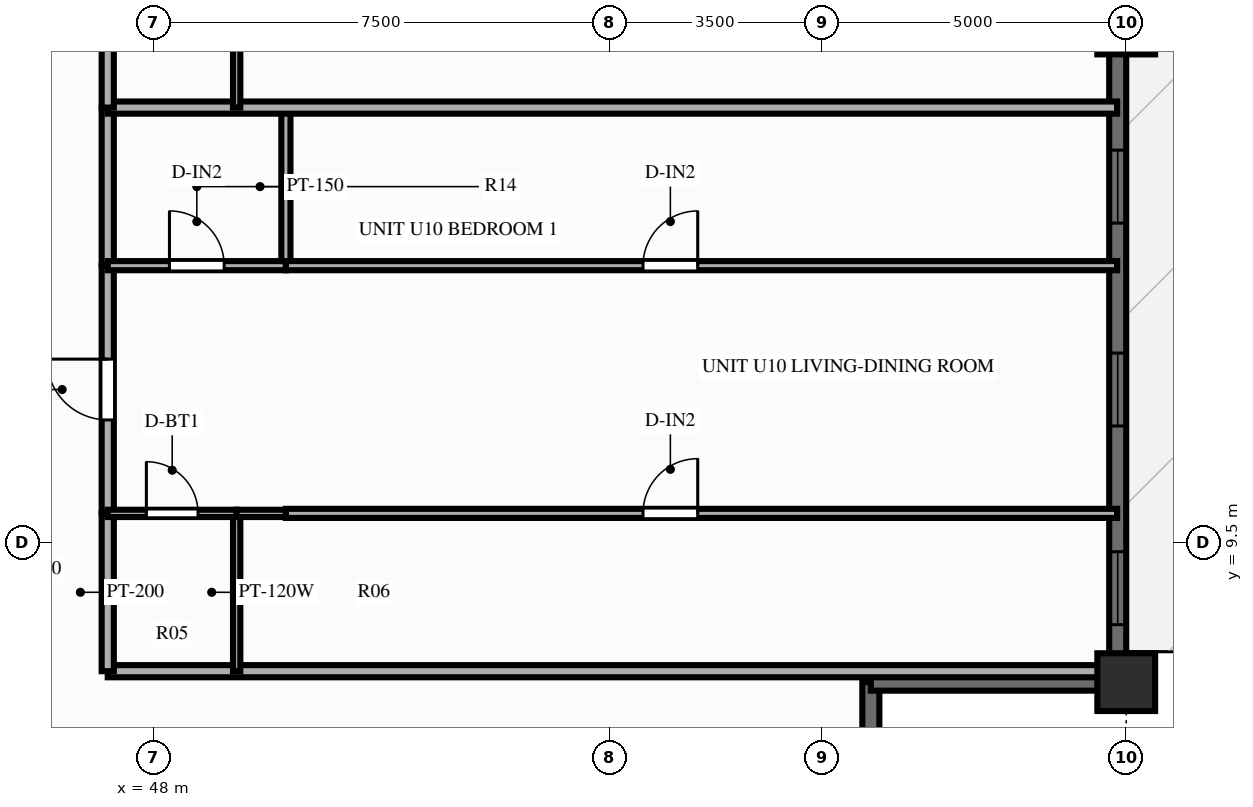
"""IFC4 building model, lengths in metres.
Left out: names, types, materials, properties, quantities, classifications, styles, units other than length and angle.
Written with IfcOpenShell. Run it as: python <this file> out.ifc"""

import sys

from ifc_helpers import new_model, si_unit, direction, frame, frame_2d, origin, origin_2d, place, context, subcontext, project, spatial, rectangle, extrude, source, transform, mapped, element, fill, save


model = new_model("IFC4")
c1 = context("Model", 3, precision=1e-05, world=origin(), true_north=direction((0.0, 1.0)))
c2 = subcontext(c1, "Body", "Model", "MODEL_VIEW")
j1 = project(units=[si_unit("LENGTHUNIT", "METRE"), si_unit("PLANEANGLEUNIT", "RADIAN")], contexts=[c1])
p1 = place(None, origin())
s1 = spatial("IfcSite", under=j1, at=p1, CompositionType="ELEMENT")
p2 = place(p1, origin())
s2 = spatial("IfcBuilding", under=s1, at=p2, CompositionType="ELEMENT")
p3 = place(p2, frame((0.0, 0.0, 110.85)))
s3 = spatial("IfcBuildingStorey", under=s2, at=p3, CompositionType="ELEMENT", Elevation=110.85)
m1 = source(origin(), c2, "Body", "SweptSolid", [
    extrude(rectangle(XDim=0.95, YDim=0.95, at=origin_2d()), origin(), (0.0, 0.0, 1.0), 3.0),
])
for number, where, z_axis, x_axis in (
    (1, (64.0, 7.2, 0.0), (0.0, 0.0, 1.0), (1.0, 0.0, 0.0)),
    (2, (64.0, 18.0, 0.0), (0.0, 0.0, 1.0), (1.0, 0.0, 0.0)),
):
    element("IfcColumn", number, at=place(p3, frame(where, z_axis=z_axis, x_axis=x_axis)), inside=s3, PredefinedType="COLUMN", context=c2, shape_type="MappedRepresentation", body=[
        mapped(m1, transform((0.0, 0.0, 0.0), scale=1.0)),
    ])
p4 = place(p3, frame((63.86, 7.2, 0.0), z_axis=(0.0, 0.0, 1.0), x_axis=(0.0, 1.0, 0.0)))
e3 = element("IfcWall", 3, at=p4, inside=s3, PredefinedType="SOLIDWALL", context=c2, shape_type="SweptSolid", body=[
    extrude(rectangle(XDim=39.6, YDim=0.28, at=frame_2d((19.8, 0.0))), origin(), (0.0, 0.0, 1.0), 2.28),
])
p5 = place(p4, frame((0.945, 0.0, 0.25)))
e4 = element("IfcOpeningElement", 4, at=p5, cuts=e3, PredefinedType="OPENING", context=c2, shape_type="SweptSolid", body=[
    extrude(rectangle(XDim=1.2, YDim=1.5, at=frame_2d((0.6, 0.75))), frame((0.0, 0.152, 0.0), z_axis=(0.0, -1.0, 0.0), x_axis=(1.0, 0.0, 0.0)), (0.0, 0.0, 1.0), 0.304),
])
p6 = place(p4, frame((4.213, 0.0, 0.25)))
e5 = element("IfcOpeningElement", 5, at=p6, cuts=e3, PredefinedType="OPENING", context=c2, shape_type="SweptSolid", body=[
    extrude(rectangle(XDim=1.2, YDim=1.5, at=frame_2d((0.6, 0.75))), frame((0.0, 0.152, 0.0), z_axis=(0.0, -1.0, 0.0), x_axis=(1.0, 0.0, 0.0)), (0.0, 0.0, 1.0), 0.304),
])
p7 = place(p4, frame((7.55, 0.0, 0.25)))
e6 = element("IfcOpeningElement", 6, at=p7, cuts=e3, PredefinedType="OPENING", context=c2, shape_type="SweptSolid", body=[
    extrude(rectangle(XDim=1.2, YDim=1.5, at=frame_2d((0.6, 0.75))), frame((0.0, 0.152, 0.0), z_axis=(0.0, -1.0, 0.0), x_axis=(1.0, 0.0, 0.0)), (0.0, 0.0, 1.0), 0.304),
])
p8 = place(p4, frame((13.483, 0.0, 0.25)))
e7 = element("IfcOpeningElement", 7, at=p8, cuts=e3, PredefinedType="OPENING", context=c2, shape_type="SweptSolid", body=[
    extrude(rectangle(XDim=1.2, YDim=1.5, at=frame_2d((0.6, 0.75))), frame((0.0, 0.152, 0.0), z_axis=(0.0, -1.0, 0.0), x_axis=(1.0, 0.0, 0.0)), (0.0, 0.0, 1.0), 0.304),
])
p9 = place(p4, frame((16.82, 0.0, 0.25)))
e8 = element("IfcOpeningElement", 8, at=p9, cuts=e3, PredefinedType="OPENING", context=c2, shape_type="SweptSolid", body=[
    extrude(rectangle(XDim=1.2, YDim=1.5, at=frame_2d((0.6, 0.75))), frame((0.0, 0.152, 0.0), z_axis=(0.0, -1.0, 0.0), x_axis=(1.0, 0.0, 0.0)), (0.0, 0.0, 1.0), 0.304),
])
p10 = place(p4, frame((19.2, 0.0, 0.25)))
e9 = element("IfcOpeningElement", 9, at=p10, cuts=e3, PredefinedType="OPENING", context=c2, shape_type="SweptSolid", body=[
    extrude(rectangle(XDim=1.2, YDim=1.5, at=frame_2d((0.6, 0.75))), frame((0.0, 0.152, 0.0), z_axis=(0.0, -1.0, 0.0), x_axis=(1.0, 0.0, 0.0)), (0.0, 0.0, 1.0), 0.304),
])
p11 = place(p4, frame((21.578, 0.0, 0.25)))
e10 = element("IfcOpeningElement", 10, at=p11, cuts=e3, PredefinedType="OPENING", context=c2, shape_type="SweptSolid", body=[
    extrude(rectangle(XDim=1.2, YDim=1.5, at=frame_2d((0.6, 0.75))), frame((0.0, 0.152, 0.0), z_axis=(0.0, -1.0, 0.0), x_axis=(1.0, 0.0, 0.0)), (0.0, 0.0, 1.0), 0.304),
])
p12 = place(p4, frame((26.313, 0.0, 0.0), z_axis=(0.0, 0.0, 1.0), x_axis=(-1.0, 0.0, 0.0)))
e11 = element("IfcOpeningElement", 11, at=p12, cuts=e3, PredefinedType="OPENING", context=c2, shape_type="SweptSolid", body=[
    extrude(rectangle(XDim=1.6, YDim=2.15, at=frame_2d((0.8, 1.075))), frame((0.0, 0.152, 0.0), z_axis=(0.0, -1.0, 0.0), x_axis=(1.0, 0.0, 0.0)), (0.0, 0.0, 1.0), 0.304),
])
p13 = place(p4, frame((29.305, 0.0, 0.25)))
e12 = element("IfcOpeningElement", 12, at=p13, cuts=e3, PredefinedType="OPENING", context=c2, shape_type="SweptSolid", body=[
    extrude(rectangle(XDim=0.7, YDim=1.5, at=frame_2d((0.35, 0.75))), frame((0.0, 0.152, 0.0), z_axis=(0.0, -1.0, 0.0), x_axis=(1.0, 0.0, 0.0)), (0.0, 0.0, 1.0), 0.304),
])
p14 = place(p4, frame((30.848, 0.0, 0.25)))
e13 = element("IfcOpeningElement", 13, at=p14, cuts=e3, PredefinedType="OPENING", context=c2, shape_type="SweptSolid", body=[
    extrude(rectangle(XDim=1.2, YDim=1.5, at=frame_2d((0.6, 0.75))), frame((0.0, 0.152, 0.0), z_axis=(0.0, -1.0, 0.0), x_axis=(1.0, 0.0, 0.0)), (0.0, 0.0, 1.0), 0.304),
])
p15 = place(p4, frame((34.183, 0.0, 0.25)))
e14 = element("IfcOpeningElement", 14, at=p15, cuts=e3, PredefinedType="OPENING", context=c2, shape_type="SweptSolid", body=[
    extrude(rectangle(XDim=1.2, YDim=1.5, at=frame_2d((0.6, 0.75))), frame((0.0, 0.152, 0.0), z_axis=(0.0, -1.0, 0.0), x_axis=(1.0, 0.0, 0.0)), (0.0, 0.0, 1.0), 0.304),
])
p16 = place(p4, frame((37.452, 0.0, 0.25)))
e15 = element("IfcOpeningElement", 15, at=p16, cuts=e3, PredefinedType="OPENING", context=c2, shape_type="SweptSolid", body=[
    extrude(rectangle(XDim=1.2, YDim=1.5, at=frame_2d((0.6, 0.75))), frame((0.0, 0.152, 0.0), z_axis=(0.0, -1.0, 0.0), x_axis=(1.0, 0.0, 0.0)), (0.0, 0.0, 1.0), 0.304),
])
for number, where, z_axis, x_axis in (
    (16, (59.8, 3.08, 0.0), (0.0, 0.0, 1.0), (0.0, 1.0, 0.0)),
    (17, (59.8, 7.2, 0.0), (0.0, 0.0, 1.0), (1.0, 0.0, 0.0)),
):
    element("IfcWall", number, at=place(p3, frame(where, z_axis=z_axis, x_axis=x_axis)), inside=s3, PredefinedType="SOLIDWALL", context=c2, shape_type="SweptSolid", body=[
        extrude(rectangle(XDim=4.12, YDim=0.28, at=frame_2d((2.06, 0.0))), origin(), (0.0, 0.0, 1.0), 2.28),
    ])
p17 = place(p3, frame((47.25, 7.38, 0.0), z_axis=(0.0, 0.0, 1.0), x_axis=(1.0, 0.0, 0.0)))
e18 = element("IfcWall", 18, at=p17, inside=s3, PredefinedType="PARTITIONING", context=c2, shape_type="SweptSolid", body=[
    extrude(rectangle(XDim=16.6, YDim=0.2, at=frame_2d((8.3, 0.0))), origin(), (0.0, 0.0, 1.0), 2.79),
])
p18 = place(p3, frame((47.25, 7.38, 0.0), z_axis=(0.0, 0.0, 1.0), x_axis=(0.0, 1.0, 0.0)))
e19 = element("IfcWall", 19, at=p18, inside=s3, PredefinedType="PARTITIONING", context=c2, shape_type="SweptSolid", body=[
    extrude(rectangle(XDim=2.596, YDim=0.2, at=frame_2d((1.298, 0.0))), origin(), (0.0, 0.0, 1.0), 2.79),
])
p19 = place(p3, frame((47.25, 9.976, 0.0), z_axis=(0.0, 0.0, 1.0), x_axis=(0.0, 1.0, 0.0)))
e20 = element("IfcWall", 20, at=p19, inside=s3, PredefinedType="PARTITIONING", context=c2, shape_type="SweptSolid", body=[
    extrude(rectangle(XDim=4.074, YDim=0.2, at=frame_2d((2.037, 0.0))), origin(), (0.0, 0.0, 1.0), 2.79),
])
p20 = place(p19, frame((1.537, 0.0, 0.0)))
e21 = element("IfcOpeningElement", 21, at=p20, cuts=e20, PredefinedType="OPENING", context=c2, shape_type="SweptSolid", body=[
    extrude(rectangle(XDim=1.0, YDim=2.15, at=frame_2d((0.5, 1.075))), frame((0.0, 0.112, 0.0), z_axis=(0.0, -1.0, 0.0), x_axis=(1.0, 0.0, 0.0)), (0.0, 0.0, 1.0), 0.224),
])
p21 = place(p3, frame((47.25, 14.05, 0.0), z_axis=(0.0, 0.0, 1.0), x_axis=(0.0, 1.0, 0.0)))
e22 = element("IfcWall", 22, at=p21, inside=s3, PredefinedType="PARTITIONING", context=c2, shape_type="SweptSolid", body=[
    extrude(rectangle(XDim=2.6, YDim=0.2, at=frame_2d((1.3, 0.0))), origin(), (0.0, 0.0, 1.0), 2.79),
])
p22 = place(p3, frame((49.37, 7.38, 0.0), z_axis=(0.0, 0.0, 1.0), x_axis=(0.0, 1.0, 0.0)))
e23 = element("IfcWall", 23, at=p22, inside=s3, PredefinedType="PARTITIONING", context=c2, shape_type="SweptSolid", body=[
    extrude(rectangle(XDim=2.596, YDim=0.12, at=frame_2d((1.298, 0.0))), origin(), (0.0, 0.0, 1.0), 2.79),
])
p23 = place(p3, frame((50.18, 14.05, 0.0), z_axis=(0.0, 0.0, 1.0), x_axis=(0.0, 1.0, 0.0)))
e24 = element("IfcWall", 24, at=p23, inside=s3, PredefinedType="PARTITIONING", context=c2, shape_type="SweptSolid", body=[
    extrude(rectangle(XDim=2.6, YDim=0.15, at=frame_2d((1.3, 0.0))), origin(), (0.0, 0.0, 1.0), 2.79),
])
p24 = place(p3, frame((47.25, 9.976, 0.0), z_axis=(0.0, 0.0, 1.0), x_axis=(1.0, 0.0, 0.0)))
e25 = element("IfcWall", 25, at=p24, inside=s3, PredefinedType="PARTITIONING", context=c2, shape_type="SweptSolid", body=[
    extrude(rectangle(XDim=2.12, YDim=0.12, at=frame_2d((1.06, 0.0))), origin(), (0.0, 0.0, 1.0), 2.79),
])
p25 = place(p24, frame((0.635, 0.0, 0.0)))
e26 = element("IfcOpeningElement", 26, at=p25, cuts=e25, PredefinedType="OPENING", context=c2, shape_type="SweptSolid", body=[
    extrude(rectangle(XDim=0.85, YDim=2.05, at=frame_2d((0.425, 1.025))), frame((0.0, 0.072, 0.0), z_axis=(0.0, -1.0, 0.0), x_axis=(1.0, 0.0, 0.0)), (0.0, 0.0, 1.0), 0.144),
])
p26 = place(p3, frame((49.37, 9.976, 0.0), z_axis=(0.0, 0.0, 1.0), x_axis=(1.0, 0.0, 0.0)))
e27 = element("IfcWall", 27, at=p26, inside=s3, PredefinedType="PARTITIONING", context=c2, shape_type="SweptSolid", body=[
    extrude(rectangle(XDim=0.81, YDim=0.12, at=frame_2d((0.405, 0.0))), origin(), (0.0, 0.0, 1.0), 2.79),
])
p27 = place(p3, frame((50.18, 9.976, 0.0), z_axis=(0.0, 0.0, 1.0), x_axis=(1.0, 0.0, 0.0)))
e28 = element("IfcWall", 28, at=p27, inside=s3, PredefinedType="PARTITIONING", context=c2, shape_type="SweptSolid", body=[
    extrude(rectangle(XDim=13.67, YDim=0.15, at=frame_2d((6.835, 0.0))), origin(), (0.0, 0.0, 1.0), 2.79),
])
p28 = place(p27, frame((5.873, 0.0, 0.0)))
e29 = element("IfcOpeningElement", 29, at=p28, cuts=e28, PredefinedType="OPENING", context=c2, shape_type="SweptSolid", body=[
    extrude(rectangle(XDim=0.9, YDim=2.1, at=frame_2d((0.45, 1.05))), frame((0.0, 0.087, 0.0), z_axis=(0.0, -1.0, 0.0), x_axis=(1.0, 0.0, 0.0)), (0.0, 0.0, 1.0), 0.174),
])
p29 = place(p3, frame((47.25, 14.05, 0.0), z_axis=(0.0, 0.0, 1.0), x_axis=(1.0, 0.0, 0.0)))
e30 = element("IfcWall", 30, at=p29, inside=s3, PredefinedType="PARTITIONING", context=c2, shape_type="SweptSolid", body=[
    extrude(rectangle(XDim=2.93, YDim=0.15, at=frame_2d((1.465, 0.0))), origin(), (0.0, 0.0, 1.0), 2.79),
])
p30 = place(p29, frame((1.015, 0.0, 0.0)))
e31 = element("IfcOpeningElement", 31, at=p30, cuts=e30, PredefinedType="OPENING", context=c2, shape_type="SweptSolid", body=[
    extrude(rectangle(XDim=0.9, YDim=2.1, at=frame_2d((0.45, 1.05))), frame((0.0, 0.087, 0.0), z_axis=(0.0, -1.0, 0.0), x_axis=(1.0, 0.0, 0.0)), (0.0, 0.0, 1.0), 0.174),
])
p31 = place(p3, frame((50.18, 14.05, 0.0), z_axis=(0.0, 0.0, 1.0), x_axis=(1.0, 0.0, 0.0)))
e32 = element("IfcWall", 32, at=p31, inside=s3, PredefinedType="PARTITIONING", context=c2, shape_type="SweptSolid", body=[
    extrude(rectangle(XDim=13.67, YDim=0.15, at=frame_2d((6.835, 0.0))), origin(), (0.0, 0.0, 1.0), 2.79),
])
p32 = place(p31, frame((5.873, 0.0, 0.0)))
e33 = element("IfcOpeningElement", 33, at=p32, cuts=e32, PredefinedType="OPENING", context=c2, shape_type="SweptSolid", body=[
    extrude(rectangle(XDim=0.9, YDim=2.1, at=frame_2d((0.45, 1.05))), frame((0.0, 0.087, 0.0), z_axis=(0.0, -1.0, 0.0), x_axis=(1.0, 0.0, 0.0)), (0.0, 0.0, 1.0), 0.174),
])
p33 = place(p3, frame((47.25, 16.65, 0.0), z_axis=(0.0, 0.0, 1.0), x_axis=(1.0, 0.0, 0.0)))
e34 = element("IfcWall", 34, at=p33, inside=s3, PredefinedType="PARTITIONING", context=c2, shape_type="SweptSolid", body=[
    extrude(rectangle(XDim=16.6, YDim=0.2, at=frame_2d((8.3, 0.0))), origin(), (0.0, 0.0, 1.0), 2.79),
])
p34 = place(p3, frame((47.25, 16.65, 0.0), z_axis=(0.0, 0.0, 1.0), x_axis=(0.0, 1.0, 0.0)))
e35 = element("IfcWall", 35, at=p34, inside=s3, PredefinedType="PARTITIONING", context=c2, shape_type="SweptSolid", body=[
    extrude(rectangle(XDim=2.596, YDim=0.2, at=frame_2d((1.298, 0.0))), origin(), (0.0, 0.0, 1.0), 2.79),
])
p35 = place(p3, frame((49.37, 16.65, 0.0), z_axis=(0.0, 0.0, 1.0), x_axis=(0.0, 1.0, 0.0)))
e36 = element("IfcWall", 36, at=p35, inside=s3, PredefinedType="PARTITIONING", context=c2, shape_type="SweptSolid", body=[
    extrude(rectangle(XDim=2.596, YDim=0.12, at=frame_2d((1.298, 0.0))), origin(), (0.0, 0.0, 1.0), 2.79),
])
m2 = source(origin(), c2, "Body", "SweptSolid", [
    extrude(rectangle(XDim=1.2, YDim=1.5, at=frame_2d((0.6, 0.75))), frame((0.0, 0.03, 0.0), z_axis=(0.0, -1.0, 0.0), x_axis=(1.0, 0.0, 0.0)), (0.0, 0.0, 1.0), 0.06),
])
p36 = place(p5, origin())
e37 = element("IfcWindow", 37, at=p36, inside=s3, PartitioningType="SINGLE_PANEL", PredefinedType="WINDOW", context=c2, shape_type="MappedRepresentation", body=[
    mapped(m2, transform((0.0, 0.0, 0.0), scale=1.0)),
])
fill(e4, e37)
p37 = place(p6, origin())
e38 = element("IfcWindow", 38, at=p37, inside=s3, PartitioningType="SINGLE_PANEL", PredefinedType="WINDOW", context=c2, shape_type="MappedRepresentation", body=[
    mapped(m2, transform((0.0, 0.0, 0.0), scale=1.0)),
])
fill(e5, e38)
p38 = place(p7, origin())
e39 = element("IfcWindow", 39, at=p38, inside=s3, PartitioningType="SINGLE_PANEL", PredefinedType="WINDOW", context=c2, shape_type="MappedRepresentation", body=[
    mapped(m2, transform((0.0, 0.0, 0.0), scale=1.0)),
])
fill(e6, e39)
m3 = source(origin(), c2, "Body", "SweptSolid", [
    extrude(rectangle(XDim=1.0, YDim=2.15, at=frame_2d((0.5, 1.075))), frame((0.0, 0.025, 0.0), z_axis=(0.0, -1.0, 0.0), x_axis=(1.0, 0.0, 0.0)), (0.0, 0.0, 1.0), 0.05),
])
p39 = place(p20, origin())
e40 = element("IfcDoor", 40, at=p39, inside=s3, OperationType="SINGLE_SWING_RIGHT", PredefinedType="DOOR", context=c2, shape_type="MappedRepresentation", body=[
    mapped(m3, transform((0.0, 0.0, 0.0), scale=1.0)),
])
fill(e21, e40)
m4 = source(origin(), c2, "Body", "SweptSolid", [
    extrude(rectangle(XDim=0.85, YDim=2.05, at=frame_2d((0.425, 1.025))), frame((0.0, 0.025, 0.0), z_axis=(0.0, -1.0, 0.0), x_axis=(1.0, 0.0, 0.0)), (0.0, 0.0, 1.0), 0.05),
])
p40 = place(p25, origin())
e41 = element("IfcDoor", 41, at=p40, inside=s3, OperationType="SINGLE_SWING_LEFT", PredefinedType="DOOR", context=c2, shape_type="MappedRepresentation", body=[
    mapped(m4, transform((0.0, 0.0, 0.0), scale=1.0)),
])
fill(e26, e41)
m5 = source(origin(), c2, "Body", "SweptSolid", [
    extrude(rectangle(XDim=0.9, YDim=2.1, at=frame_2d((0.45, 1.05))), frame((0.0, 0.025, 0.0), z_axis=(0.0, -1.0, 0.0), x_axis=(1.0, 0.0, 0.0)), (0.0, 0.0, 1.0), 0.05),
])
p41 = place(p28, origin())
e42 = element("IfcDoor", 42, at=p41, inside=s3, OperationType="SINGLE_SWING_RIGHT", PredefinedType="DOOR", context=c2, shape_type="MappedRepresentation", body=[
    mapped(m5, transform((0.0, 0.0, 0.0), scale=1.0)),
])
fill(e29, e42)
p42 = place(p30, origin())
e43 = element("IfcDoor", 43, at=p42, inside=s3, OperationType="SINGLE_SWING_LEFT", PredefinedType="DOOR", context=c2, shape_type="MappedRepresentation", body=[
    mapped(m5, transform((0.0, 0.0, 0.0), scale=1.0)),
])
fill(e31, e43)
p43 = place(p32, origin())
e44 = element("IfcDoor", 44, at=p43, inside=s3, OperationType="SINGLE_SWING_RIGHT", PredefinedType="DOOR", context=c2, shape_type="MappedRepresentation", body=[
    mapped(m5, transform((0.0, 0.0, 0.0), scale=1.0)),
])
fill(e33, e44)
save(model, sys.argv[1])
